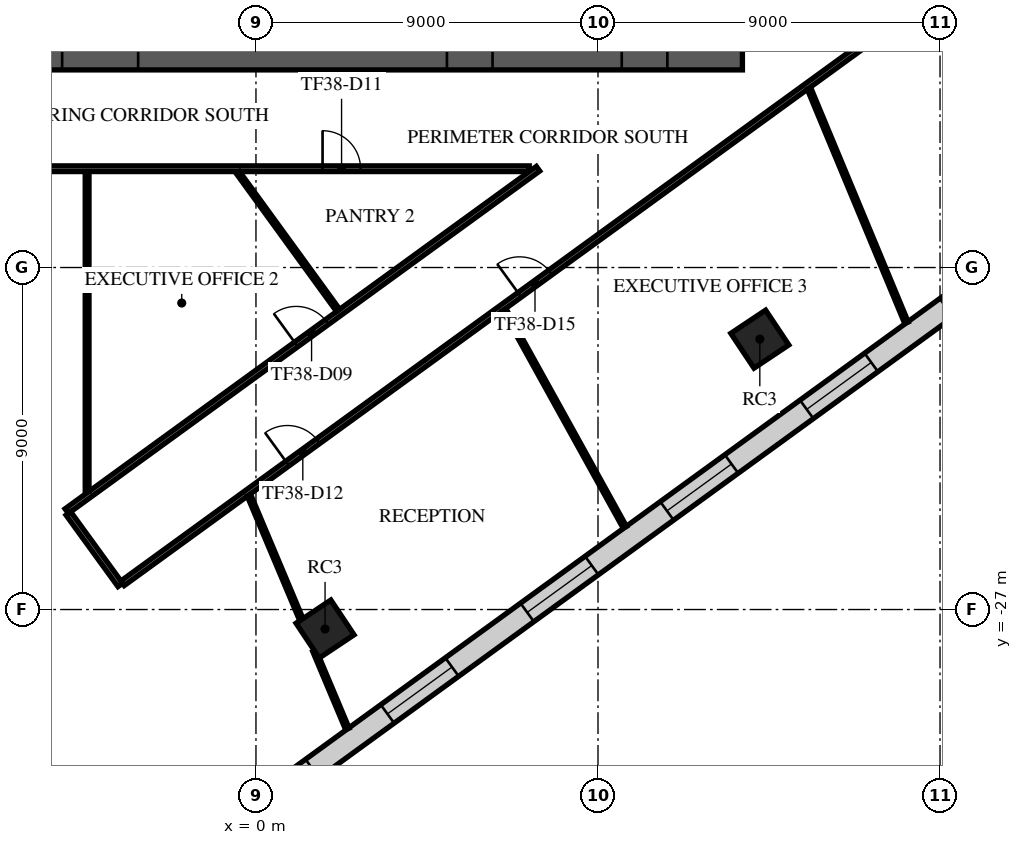
"""IFC4 building model, lengths in metres.
Left out: names, types, materials, properties, quantities, classifications, styles, units other than length and angle.
Written with IfcOpenShell. Run it as: python <this file> out.ifc"""

import sys

from ifc_helpers import new_model, si_unit, direction, frame, frame_2d, origin, origin_2d, place, context, subcontext, project, spatial, rectangle, extrude, element, fill, save


model = new_model("IFC4")
c1 = context("Model", 3, precision=1e-05, world=origin(), true_north=direction((0.0, 1.0)))
c2 = subcontext(c1, "Body", "Model", "MODEL_VIEW")
j1 = project(units=[si_unit("LENGTHUNIT", "METRE"), si_unit("PLANEANGLEUNIT", "RADIAN")], contexts=[c1])
p1 = place(None, origin())
s1 = spatial("IfcSite", under=j1, at=p1, CompositionType="ELEMENT")
p2 = place(p1, origin())
s2 = spatial("IfcBuilding", under=s1, at=p2, CompositionType="ELEMENT")
p3 = place(p2, frame((0.0, 0.0, 163.7)))
s3 = spatial("IfcBuildingStorey", under=s2, at=p3, CompositionType="ELEMENT", Elevation=163.7)
for number, where, z_axis, x_axis in (
    (1, (1.818, -27.513, 0.0), (0.0, 0.0, 1.0), (0.832, 0.555, 0.0)),
    (2, (13.258, -19.885, 0.0), (0.0, 0.0, 1.0), (0.832, 0.555, 0.0)),
):
    element("IfcColumn", number, at=place(p3, frame(where, z_axis=z_axis, x_axis=x_axis)), inside=s3, PredefinedType="COLUMN", context=c2, shape_type="SweptSolid", body=[
        extrude(rectangle(XDim=1.1, YDim=1.1, at=origin_2d()), origin(), (0.0, 0.0, 1.0), 4.0),
    ])
p4 = place(p3, frame((-12.8, -12.3, 0.0), z_axis=(0.0, 0.0, 1.0), x_axis=(1.0, 0.0, 0.0)))
e3 = element("IfcWall", 3, at=p4, inside=s3, PredefinedType="SHEAR", context=c2, shape_type="SweptSolid", body=[
    extrude(rectangle(XDim=25.6, YDim=1.0, at=frame_2d((12.8, 0.0))), origin(), (0.0, 0.0, 1.0), 3.6),
])
p5 = place(p4, frame((7.7, 0.0, 0.0)))
e4 = element("IfcOpeningElement", 4, at=p5, cuts=e3, PredefinedType="OPENING", context=c2, shape_type="SweptSolid", body=[
    extrude(rectangle(XDim=2.0, YDim=2.1, at=frame_2d((1.0, 1.05))), frame((0.0, 0.51, 0.0), z_axis=(0.0, -1.0, 0.0), x_axis=(1.0, 0.0, 0.0)), (0.0, 0.0, 1.0), 1.02),
])
p6 = place(p4, frame((17.825, 0.0, 0.0)))
e5 = element("IfcOpeningElement", 5, at=p6, cuts=e3, PredefinedType="OPENING", context=c2, shape_type="SweptSolid", body=[
    extrude(rectangle(XDim=1.2, YDim=2.1, at=frame_2d((0.6, 1.05))), frame((0.0, 0.51, 0.0), z_axis=(0.0, -1.0, 0.0), x_axis=(1.0, 0.0, 0.0)), (0.0, 0.0, 1.0), 1.02),
])
p7 = place(p4, frame((1.975, 0.0, 0.0)))
e6 = element("IfcOpeningElement", 6, at=p7, cuts=e3, PredefinedType="OPENING", context=c2, shape_type="SweptSolid", body=[
    extrude(rectangle(XDim=1.2, YDim=2.1, at=frame_2d((0.6, 1.05))), frame((0.0, 0.51, 0.0), z_axis=(0.0, -1.0, 0.0), x_axis=(1.0, 0.0, 0.0)), (0.0, 0.0, 1.0), 1.02),
])
p8 = place(p4, frame((22.425, 0.0, 0.0)))
e7 = element("IfcOpeningElement", 7, at=p8, cuts=e3, PredefinedType="OPENING", context=c2, shape_type="SweptSolid", body=[
    extrude(rectangle(XDim=1.2, YDim=2.1, at=frame_2d((0.6, 1.05))), frame((0.0, 0.51, 0.0), z_axis=(0.0, -1.0, 0.0), x_axis=(1.0, 0.0, 0.0)), (0.0, 0.0, 1.0), 1.02),
])
p9 = place(p3, frame((-4.784, -35.737, 0.0), z_axis=(0.0, 0.0, 1.0), x_axis=(0.809019283075, 0.587782102154, 0.0)))
e8 = element("IfcWall", 8, at=p9, inside=s3, PredefinedType="STANDARD", context=c2, shape_type="SweptSolid", body=[
    extrude(rectangle(XDim=49.751, YDim=0.6, at=frame_2d((24.875, 0.0))), origin(), (0.0, 0.0, 1.0), 3.6),
])
p10 = place(p9, frame((1.161, 0.0, 0.9)))
e9 = element("IfcOpeningElement", 9, at=p10, cuts=e8, PredefinedType="OPENING", context=c2, shape_type="SweptSolid", body=[
    extrude(rectangle(XDim=2.1, YDim=2.1, at=frame_2d((1.05, 1.05))), frame((0.0, 0.31, 0.0), z_axis=(0.0, -1.0, 0.0), x_axis=(1.0, 0.0, 0.0)), (0.0, 0.0, 1.0), 0.62),
])
p11 = place(p9, frame((5.644, 0.0, 0.9)))
e10 = element("IfcOpeningElement", 10, at=p11, cuts=e8, PredefinedType="OPENING", context=c2, shape_type="SweptSolid", body=[
    extrude(rectangle(XDim=2.1, YDim=2.1, at=frame_2d((1.05, 1.05))), frame((0.0, 0.31, 0.0), z_axis=(0.0, -1.0, 0.0), x_axis=(1.0, 0.0, 0.0)), (0.0, 0.0, 1.0), 0.62),
])
p12 = place(p9, frame((10.189, 0.0, 0.9)))
e11 = element("IfcOpeningElement", 11, at=p12, cuts=e8, PredefinedType="OPENING", context=c2, shape_type="SweptSolid", body=[
    extrude(rectangle(XDim=2.1, YDim=2.1, at=frame_2d((1.05, 1.05))), frame((0.0, 0.31, 0.0), z_axis=(0.0, -1.0, 0.0), x_axis=(1.0, 0.0, 0.0)), (0.0, 0.0, 1.0), 0.62),
])
p13 = place(p9, frame((14.735, 0.0, 0.9)))
e12 = element("IfcOpeningElement", 12, at=p13, cuts=e8, PredefinedType="OPENING", context=c2, shape_type="SweptSolid", body=[
    extrude(rectangle(XDim=2.1, YDim=2.1, at=frame_2d((1.05, 1.05))), frame((0.0, 0.31, 0.0), z_axis=(0.0, -1.0, 0.0), x_axis=(1.0, 0.0, 0.0)), (0.0, 0.0, 1.0), 0.62),
])
p14 = place(p9, frame((19.28, 0.0, 0.9)))
e13 = element("IfcOpeningElement", 13, at=p14, cuts=e8, PredefinedType="OPENING", context=c2, shape_type="SweptSolid", body=[
    extrude(rectangle(XDim=2.1, YDim=2.1, at=frame_2d((1.05, 1.05))), frame((0.0, 0.31, 0.0), z_axis=(0.0, -1.0, 0.0), x_axis=(1.0, 0.0, 0.0)), (0.0, 0.0, 1.0), 0.62),
])
p15 = place(p9, frame((23.826, 0.0, 0.9)))
e14 = element("IfcOpeningElement", 14, at=p15, cuts=e8, PredefinedType="OPENING", context=c2, shape_type="SweptSolid", body=[
    extrude(rectangle(XDim=2.1, YDim=2.1, at=frame_2d((1.05, 1.05))), frame((0.0, 0.31, 0.0), z_axis=(0.0, -1.0, 0.0), x_axis=(1.0, 0.0, 0.0)), (0.0, 0.0, 1.0), 0.62),
])
p16 = place(p9, frame((28.371, 0.0, 0.9)))
e15 = element("IfcOpeningElement", 15, at=p16, cuts=e8, PredefinedType="OPENING", context=c2, shape_type="SweptSolid", body=[
    extrude(rectangle(XDim=2.1, YDim=2.1, at=frame_2d((1.05, 1.05))), frame((0.0, 0.31, 0.0), z_axis=(0.0, -1.0, 0.0), x_axis=(1.0, 0.0, 0.0)), (0.0, 0.0, 1.0), 0.62),
])
p17 = place(p9, frame((32.917, 0.0, 0.9)))
e16 = element("IfcOpeningElement", 16, at=p17, cuts=e8, PredefinedType="OPENING", context=c2, shape_type="SweptSolid", body=[
    extrude(rectangle(XDim=2.1, YDim=2.1, at=frame_2d((1.05, 1.05))), frame((0.0, 0.31, 0.0), z_axis=(0.0, -1.0, 0.0), x_axis=(1.0, 0.0, 0.0)), (0.0, 0.0, 1.0), 0.62),
])
p18 = place(p9, frame((37.462, 0.0, 0.9)))
e17 = element("IfcOpeningElement", 17, at=p18, cuts=e8, PredefinedType="OPENING", context=c2, shape_type="SweptSolid", body=[
    extrude(rectangle(XDim=2.1, YDim=2.1, at=frame_2d((1.05, 1.05))), frame((0.0, 0.31, 0.0), z_axis=(0.0, -1.0, 0.0), x_axis=(1.0, 0.0, 0.0)), (0.0, 0.0, 1.0), 0.62),
])
p19 = place(p9, frame((42.008, 0.0, 0.9)))
e18 = element("IfcOpeningElement", 18, at=p19, cuts=e8, PredefinedType="OPENING", context=c2, shape_type="SweptSolid", body=[
    extrude(rectangle(XDim=2.1, YDim=2.1, at=frame_2d((1.05, 1.05))), frame((0.0, 0.31, 0.0), z_axis=(0.0, -1.0, 0.0), x_axis=(1.0, 0.0, 0.0)), (0.0, 0.0, 1.0), 0.62),
])
p20 = place(p9, frame((46.491, 0.0, 0.9)))
e19 = element("IfcOpeningElement", 19, at=p20, cuts=e8, PredefinedType="OPENING", context=c2, shape_type="SweptSolid", body=[
    extrude(rectangle(XDim=2.1, YDim=2.1, at=frame_2d((1.05, 1.05))), frame((0.0, 0.31, 0.0), z_axis=(0.0, -1.0, 0.0), x_axis=(1.0, 0.0, 0.0)), (0.0, 0.0, 1.0), 0.62),
])
p21 = place(p3, frame((-13.289, -15.4, 0.0), z_axis=(0.0, 0.0, 1.0), x_axis=(1.0, 0.0, 0.0)))
e20 = element("IfcWall", 20, at=p21, inside=s3, PredefinedType="PARTITIONING", context=c2, shape_type="SweptSolid", body=[
    extrude(rectangle(XDim=20.48, YDim=0.15, at=frame_2d((10.24, 0.0))), origin(), (0.0, 0.0, 1.0), 3.15),
])
p22 = place(p21, frame((15.041, 0.0, 0.0)))
e21 = element("IfcOpeningElement", 21, at=p22, cuts=e20, PredefinedType="OPENING", context=c2, shape_type="SweptSolid", body=[
    extrude(rectangle(XDim=1.0, YDim=2.1, at=frame_2d((0.5, 1.05))), frame((0.0, 0.085, 0.0), z_axis=(0.0, -1.0, 0.0), x_axis=(1.0, 0.0, 0.0)), (0.0, 0.0, 1.0), 0.17),
])
p23 = place(p3, frame((-4.98, -24.411, 0.0), z_axis=(0.0, 0.0, 1.0), x_axis=(0.809006648498, 0.587799491907, 0.0)))
e22 = element("IfcWall", 22, at=p23, inside=s3, PredefinedType="PARTITIONING", context=c2, shape_type="SweptSolid", body=[
    extrude(rectangle(XDim=15.33, YDim=0.15, at=frame_2d((7.665, 0.0))), origin(), (0.0, 0.0, 1.0), 3.15),
])
p24 = place(p23, frame((7.464, 0.0, 0.0)))
e23 = element("IfcOpeningElement", 23, at=p24, cuts=e22, PredefinedType="OPENING", context=c2, shape_type="SweptSolid", body=[
    extrude(rectangle(XDim=1.0, YDim=2.1, at=frame_2d((0.5, 1.05))), frame((0.0, 0.085, 0.0), z_axis=(0.0, -1.0, 0.0), x_axis=(1.0, 0.0, 0.0)), (0.0, 0.0, 1.0), 0.17),
])
p25 = place(p3, frame((-4.936, -24.472, 0.0), z_axis=(0.0, 0.0, 1.0), x_axis=(0.5874596315, -0.809253471638, 0.0)))
e24 = element("IfcWall", 24, at=p25, inside=s3, PredefinedType="PARTITIONING", context=c2, shape_type="SweptSolid", body=[
    extrude(rectangle(XDim=2.325, YDim=0.15, at=frame_2d((1.162, 0.0))), origin(), (0.0, 0.0, 1.0), 3.15),
])
p26 = place(p3, frame((-3.509, -26.309, 0.0), z_axis=(0.0, 0.0, 1.0), x_axis=(0.809024097608, 0.587775475407, 0.0)))
e25 = element("IfcWall", 25, at=p26, inside=s3, PredefinedType="PARTITIONING", context=c2, shape_type="SweptSolid", body=[
    extrude(rectangle(XDim=36.68, YDim=0.15, at=frame_2d((18.34, 0.0))), origin(), (0.0, 0.0, 1.0), 3.15),
])
p27 = place(p26, frame((5.361, 0.0, 0.0)))
e26 = element("IfcOpeningElement", 26, at=p27, cuts=e25, PredefinedType="OPENING", context=c2, shape_type="SweptSolid", body=[
    extrude(rectangle(XDim=1.0, YDim=2.1, at=frame_2d((0.5, 1.05))), frame((0.0, 0.085, 0.0), z_axis=(0.0, -1.0, 0.0), x_axis=(1.0, 0.0, 0.0)), (0.0, 0.0, 1.0), 0.17),
])
p28 = place(p26, frame((12.913, 0.0, 0.0)))
e27 = element("IfcOpeningElement", 27, at=p28, cuts=e25, PredefinedType="OPENING", context=c2, shape_type="SweptSolid", body=[
    extrude(rectangle(XDim=1.0, YDim=2.1, at=frame_2d((0.5, 1.05))), frame((0.0, 0.085, 0.0), z_axis=(0.0, -1.0, 0.0), x_axis=(1.0, 0.0, 0.0)), (0.0, 0.0, 1.0), 0.17),
])
p29 = place(p26, frame((27.576, 0.0, 0.0)))
e28 = element("IfcOpeningElement", 28, at=p29, cuts=e25, PredefinedType="OPENING", context=c2, shape_type="SweptSolid", body=[
    extrude(rectangle(XDim=1.0, YDim=2.1, at=frame_2d((0.5, 1.05))), frame((0.0, 0.085, 0.0), z_axis=(0.0, -1.0, 0.0), x_axis=(1.0, 0.0, 0.0)), (0.0, 0.0, 1.0), 0.17),
])
p30 = place(p3, frame((-4.443, -23.892, 0.0), z_axis=(0.0, 0.0, 1.0), x_axis=(0.0, 1.0, 0.0)))
e29 = element("IfcWall", 29, at=p30, inside=s3, PredefinedType="PARTITIONING", context=c2, shape_type="SweptSolid", body=[
    extrude(rectangle(XDim=8.417, YDim=0.1, at=frame_2d((4.208, 0.0))), origin(), (0.0, 0.0, 1.0), 3.6),
])
p31 = place(p3, frame((-0.472, -15.504, 0.0), z_axis=(0.0, 0.0, 1.0), x_axis=(0.587831486694, -0.808983401097, 0.0)))
e30 = element("IfcWall", 30, at=p31, inside=s3, PredefinedType="PARTITIONING", context=c2, shape_type="SweptSolid", body=[
    extrude(rectangle(XDim=4.481, YDim=0.1, at=frame_2d((2.24, 0.0))), origin(), (0.0, 0.0, 1.0), 3.15),
])
p32 = place(p3, frame((-0.182, -23.998, 0.0), z_axis=(0.0, 0.0, 1.0), x_axis=(0.388072383156, -0.921628897893, 0.0)))
e31 = element("IfcWall", 31, at=p32, inside=s3, PredefinedType="PARTITIONING", context=c2, shape_type="SweptSolid", body=[
    extrude(rectangle(XDim=3.548, YDim=0.1, at=frame_2d((1.774, 0.0))), origin(), (0.0, 0.0, 1.0), 3.6),
])
p33 = place(p3, frame((1.541, -28.089, 0.0), z_axis=(0.0, 0.0, 1.0), x_axis=(0.388007971135, -0.92165601736, 0.0)))
e32 = element("IfcWall", 32, at=p33, inside=s3, PredefinedType="PARTITIONING", context=c2, shape_type="SweptSolid", body=[
    extrude(rectangle(XDim=2.226, YDim=0.1, at=frame_2d((1.113, 0.0))), origin(), (0.0, 0.0, 1.0), 3.6),
])
p34 = place(p3, frame((6.537, -19.111, 0.0), z_axis=(0.0, 0.0, 1.0), x_axis=(0.484305684631, -0.874898853488, 0.0)))
e33 = element("IfcWall", 33, at=p34, inside=s3, PredefinedType="PARTITIONING", context=c2, shape_type="SweptSolid", body=[
    extrude(rectangle(XDim=6.544, YDim=0.1, at=frame_2d((3.272, 0.0))), origin(), (0.0, 0.0, 1.0), 2.9),
])
p35 = place(p3, frame((14.554, -13.292, 0.0), z_axis=(0.0, 0.0, 1.0), x_axis=(0.384012483771, -0.923327900753, 0.0)))
e34 = element("IfcWall", 34, at=p35, inside=s3, PredefinedType="PARTITIONING", context=c2, shape_type="SweptSolid", body=[
    extrude(rectangle(XDim=6.672, YDim=0.1, at=frame_2d((3.336, 0.0))), origin(), (0.0, 0.0, 1.0), 2.9),
])
p36 = place(p12, origin())
e35 = element("IfcWindow", 35, at=p36, inside=s3, PartitioningType="SINGLE_PANEL", PredefinedType="WINDOW", context=c2, shape_type="SweptSolid", body=[
    extrude(rectangle(XDim=2.1, YDim=2.1, at=frame_2d((1.05, 1.05))), frame((0.0, 0.03, 0.0), z_axis=(0.0, -1.0, 0.0), x_axis=(1.0, 0.0, 0.0)), (0.0, 0.0, 1.0), 0.06),
])
fill(e11, e35)
p37 = place(p13, origin())
e36 = element("IfcWindow", 36, at=p37, inside=s3, PartitioningType="SINGLE_PANEL", PredefinedType="WINDOW", context=c2, shape_type="SweptSolid", body=[
    extrude(rectangle(XDim=2.1, YDim=2.1, at=frame_2d((1.05, 1.05))), frame((0.0, 0.03, 0.0), z_axis=(0.0, -1.0, 0.0), x_axis=(1.0, 0.0, 0.0)), (0.0, 0.0, 1.0), 0.06),
])
fill(e12, e36)
p38 = place(p14, origin())
e37 = element("IfcWindow", 37, at=p38, inside=s3, PartitioningType="SINGLE_PANEL", PredefinedType="WINDOW", context=c2, shape_type="SweptSolid", body=[
    extrude(rectangle(XDim=2.1, YDim=2.1, at=frame_2d((1.05, 1.05))), frame((0.0, 0.03, 0.0), z_axis=(0.0, -1.0, 0.0), x_axis=(1.0, 0.0, 0.0)), (0.0, 0.0, 1.0), 0.06),
])
fill(e13, e37)
p39 = place(p15, origin())
e38 = element("IfcWindow", 38, at=p39, inside=s3, PartitioningType="SINGLE_PANEL", PredefinedType="WINDOW", context=c2, shape_type="SweptSolid", body=[
    extrude(rectangle(XDim=2.1, YDim=2.1, at=frame_2d((1.05, 1.05))), frame((0.0, 0.03, 0.0), z_axis=(0.0, -1.0, 0.0), x_axis=(1.0, 0.0, 0.0)), (0.0, 0.0, 1.0), 0.06),
])
fill(e14, e38)
p40 = place(p24, origin())
e39 = element("IfcDoor", 39, at=p40, inside=s3, OperationType="SINGLE_SWING_RIGHT", PredefinedType="DOOR", context=c2, shape_type="SweptSolid", body=[
    extrude(rectangle(XDim=1.0, YDim=2.1, at=frame_2d((0.5, 1.05))), frame((0.0, 0.025, 0.0), z_axis=(0.0, -1.0, 0.0), x_axis=(1.0, 0.0, 0.0)), (0.0, 0.0, 1.0), 0.05),
])
fill(e23, e39)
p41 = place(p22, frame((1.0, 0.0, 0.0), z_axis=(0.0, 0.0, 1.0), x_axis=(-1.0, 0.0, 0.0)))
e40 = element("IfcDoor", 40, at=p41, inside=s3, OperationType="SINGLE_SWING_LEFT", PredefinedType="DOOR", context=c2, shape_type="SweptSolid", body=[
    extrude(rectangle(XDim=1.0, YDim=2.1, at=frame_2d((0.5, 1.05))), frame((0.0, 0.025, 0.0), z_axis=(0.0, -1.0, 0.0), x_axis=(1.0, 0.0, 0.0)), (0.0, 0.0, 1.0), 0.05),
])
fill(e21, e40)
p42 = place(p27, frame((1.0, 0.0, 0.0), z_axis=(0.0, 0.0, 1.0), x_axis=(-1.0, 0.0, 0.0)))
e41 = element("IfcDoor", 41, at=p42, inside=s3, OperationType="SINGLE_SWING_LEFT", PredefinedType="DOOR", context=c2, shape_type="SweptSolid", body=[
    extrude(rectangle(XDim=1.0, YDim=2.1, at=frame_2d((0.5, 1.05))), frame((0.0, 0.025, 0.0), z_axis=(0.0, -1.0, 0.0), x_axis=(1.0, 0.0, 0.0)), (0.0, 0.0, 1.0), 0.05),
])
fill(e26, e41)
p43 = place(p28, frame((1.0, 0.0, 0.0), z_axis=(0.0, 0.0, 1.0), x_axis=(-1.0, 0.0, 0.0)))
e42 = element("IfcDoor", 42, at=p43, inside=s3, OperationType="SINGLE_SWING_RIGHT", PredefinedType="DOOR", context=c2, shape_type="SweptSolid", body=[
    extrude(rectangle(XDim=1.0, YDim=2.1, at=frame_2d((0.5, 1.05))), frame((0.0, 0.025, 0.0), z_axis=(0.0, -1.0, 0.0), x_axis=(1.0, 0.0, 0.0)), (0.0, 0.0, 1.0), 0.05),
])
fill(e27, e42)
save(model, sys.argv[1])
